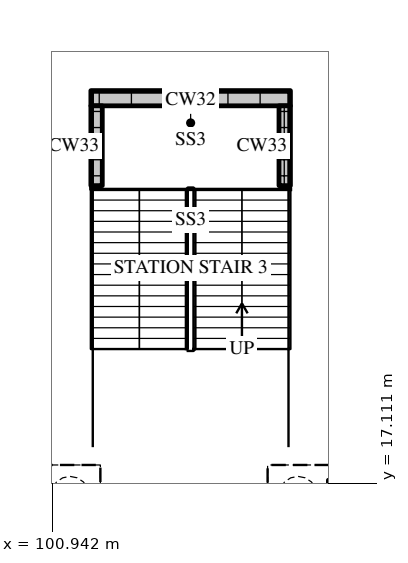
"""IFC4 building model, lengths in metres.
Left out: names, types, materials, properties, quantities, classifications, styles, units other than length and angle.
Written with IfcOpenShell. Run it as: python <this file> out.ifc"""

import sys

from ifc_helpers import new_model, si_unit, direction, frame, frame_2d, origin, place, context, subcontext, project, spatial, rectangle, extrude, element, save


model = new_model("IFC4")
c1 = context("Model", 3, precision=1e-05, world=origin(), true_north=direction((0.0, 1.0)))
c2 = subcontext(c1, "Body", "Model", "MODEL_VIEW")
j1 = project(units=[si_unit("LENGTHUNIT", "METRE"), si_unit("PLANEANGLEUNIT", "RADIAN")], contexts=[c1])
p1 = place(None, origin())
s1 = spatial("IfcSite", under=j1, at=p1, CompositionType="ELEMENT")
p2 = place(p1, origin())
s2 = spatial("IfcBuilding", under=s1, at=p2, CompositionType="ELEMENT")
p3 = place(p2, frame((0.0, 0.0, -6.0)))
s3 = spatial("IfcBuildingStorey", under=s2, at=p3, CompositionType="ELEMENT", Elevation=-6.0)
p4 = place(p3, frame((107.2, 27.25, 0.0), z_axis=(0.0, 0.0, 1.0), x_axis=(-1.0, 0.0, 0.0)))
e1 = element("IfcWall", 1, at=p4, inside=s3, PredefinedType="SOLIDWALL", context=c2, shape_type="SweptSolid", body=[
    extrude(rectangle(XDim=5.25, YDim=0.4, at=frame_2d((2.625, 0.0))), origin(), (0.0, 0.0, 1.0), 2.8),
])
for number, where, z_axis, x_axis in (
    (2, (107.05, 24.95, 0.0), (0.0, 0.0, 1.0), (0.0, 1.0, 0.0)),
    (3, (102.1, 24.95, 0.0), (0.0, 0.0, 1.0), (0.0, 1.0, 0.0)),
):
    element("IfcWall", number, at=place(p3, frame(where, z_axis=z_axis, x_axis=x_axis)), inside=s3, PredefinedType="SOLIDWALL", context=c2, shape_type="SweptSolid", body=[
        extrude(rectangle(XDim=2.1, YDim=0.3, at=frame_2d((1.05, 0.0))), origin(), (0.0, 0.0, 1.0), 2.8),
    ])
save(model, sys.argv[1])
